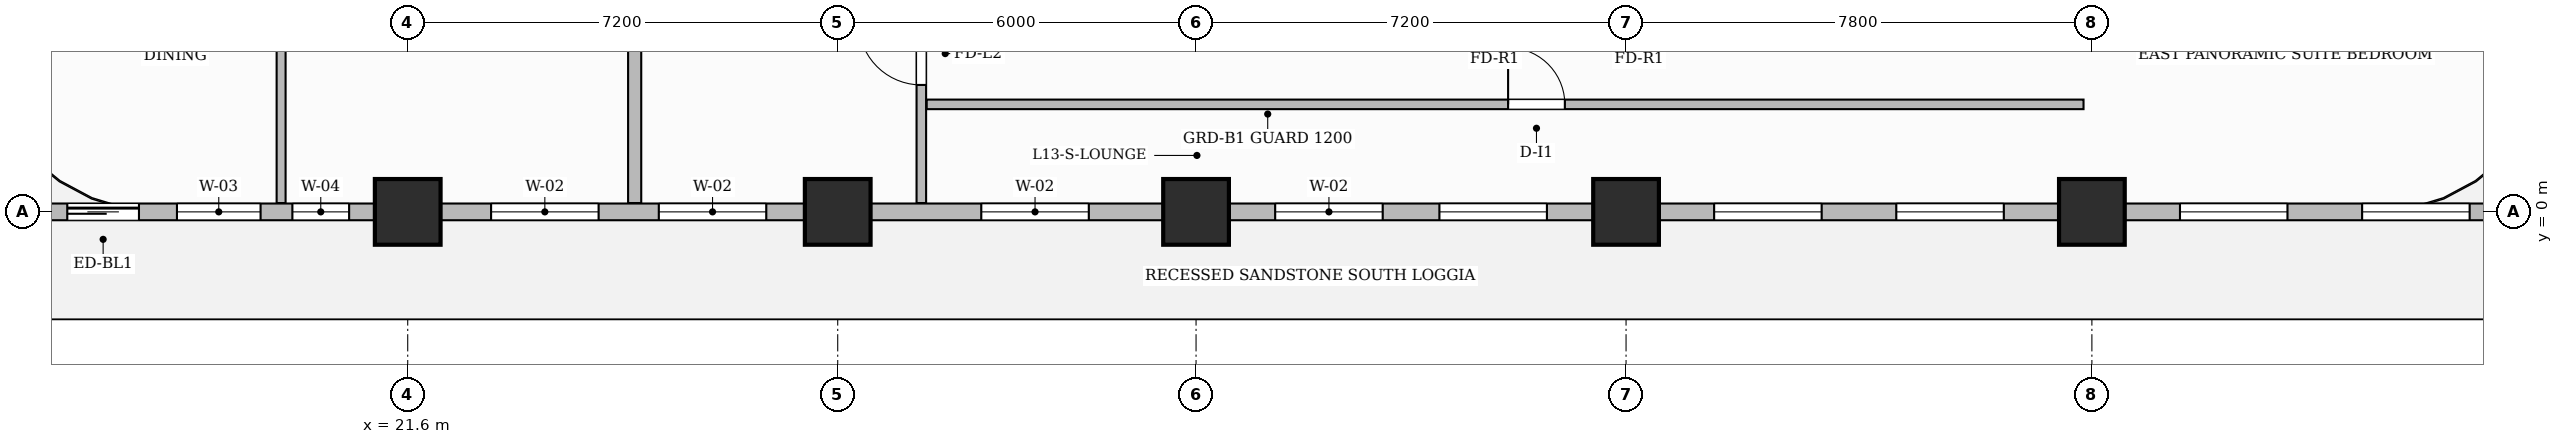
"""IFC4 building model, lengths in metres.
Left out: names, types, materials, properties, quantities, classifications, styles, units other than length and angle.
Written with IfcOpenShell. Run it as: python <this file> out.ifc"""

import sys

from ifc_helpers import new_model, si_unit, direction, frame, frame_2d, origin, origin_2d, place, context, subcontext, project, spatial, rectangle, extrude, source, transform, mapped, element, fill, save


model = new_model("IFC4")
c1 = context("Model", 3, precision=1e-05, world=origin(), true_north=direction((0.0, 1.0)))
c2 = subcontext(c1, "Body", "Model", "MODEL_VIEW")
j1 = project(units=[si_unit("LENGTHUNIT", "METRE"), si_unit("PLANEANGLEUNIT", "RADIAN")], contexts=[c1])
p1 = place(None, origin())
s1 = spatial("IfcSite", under=j1, at=p1, CompositionType="ELEMENT")
p2 = place(p1, origin())
s2 = spatial("IfcBuilding", under=s1, at=p2, CompositionType="ELEMENT")
p3 = place(p2, frame((0.0, 0.0, 58.3)))
s3 = spatial("IfcBuildingStorey", under=s2, at=p3, CompositionType="ELEMENT", Elevation=58.3)
m1 = source(origin(), c2, "Body", "SweptSolid", [
    extrude(rectangle(XDim=1.1, YDim=1.1, at=origin_2d()), origin(), (0.0, 0.0, 1.0), 3.7),
])
for number, where, z_axis, x_axis in (
    (1, (21.6, 0.0, 0.0), (0.0, 0.0, 1.0), (1.0, 0.0, 0.0)),
    (2, (28.8, 0.0, 0.0), (0.0, 0.0, 1.0), (1.0, 0.0, 0.0)),
    (3, (34.8, 0.0, 0.0), (0.0, 0.0, 1.0), (1.0, 0.0, 0.0)),
    (4, (42.0, 0.0, 0.0), (0.0, 0.0, 1.0), (1.0, 0.0, 0.0)),
    (5, (49.8, 0.0, 0.0), (0.0, 0.0, 1.0), (1.0, 0.0, 0.0)),
):
    element("IfcColumn", number, at=place(p3, frame(where, z_axis=z_axis, x_axis=x_axis)), inside=s3, PredefinedType="COLUMN", context=c2, shape_type="MappedRepresentation", body=[
        mapped(m1, transform((0.0, 0.0, 0.0), scale=1.0)),
    ])
p4 = place(p3, frame((30.2, 0.148, 0.0), z_axis=(0.0, 0.0, 1.0), x_axis=(0.0, 1.0, 0.0)))
e6 = element("IfcWall", 6, at=p4, inside=s3, PredefinedType="PARTITIONING", context=c2, shape_type="SweptSolid", body=[
    extrude(rectangle(XDim=9.312, YDim=0.16, at=frame_2d((4.656, 0.0))), origin(), (0.0, 0.0, 1.0), 3.45),
])
p5 = place(p4, frame((1.977, 0.0, 0.0)))
e7 = element("IfcOpeningElement", 7, at=p5, cuts=e6, PredefinedType="OPENING", context=c2, shape_type="SweptSolid", body=[
    extrude(rectangle(XDim=1.05, YDim=2.15, at=frame_2d((0.525, 1.075))), frame((0.0, 0.09, 0.0), z_axis=(0.0, -1.0, 0.0), x_axis=(1.0, 0.0, 0.0)), (0.0, 0.0, 1.0), 0.18),
])
p6 = place(p3, frame((30.29, 1.8, 0.0), z_axis=(0.0, 0.0, 1.0), x_axis=(1.0, 0.0, 0.0)))
e8 = element("IfcWall", 8, at=p6, inside=s3, PredefinedType="PARTITIONING", context=c2, shape_type="SweptSolid", body=[
    extrude(rectangle(XDim=19.37, YDim=0.16, at=frame_2d((9.685, 0.0))), origin(), (0.0, 0.0, 1.0), 3.45),
])
p7 = place(p6, frame((9.735, 0.0, 0.0)))
e9 = element("IfcOpeningElement", 9, at=p7, cuts=e8, PredefinedType="OPENING", context=c2, shape_type="SweptSolid", body=[
    extrude(rectangle(XDim=0.95, YDim=2.15, at=frame_2d((0.475, 1.075))), frame((0.0, 0.09, 0.0), z_axis=(0.0, -1.0, 0.0), x_axis=(1.0, 0.0, 0.0)), (0.0, 0.0, 1.0), 0.18),
])
p8 = place(p3, frame((25.4, 0.148, 0.0), z_axis=(0.0, 0.0, 1.0), x_axis=(0.0, 1.0, 0.0)))
e10 = element("IfcWall", 10, at=p8, inside=s3, PredefinedType="PARTITIONING", context=c2, shape_type="SweptSolid", body=[
    extrude(rectangle(XDim=9.312, YDim=0.22, at=frame_2d((4.656, 0.0))), origin(), (0.0, 0.0, 1.0), 3.035),
])
p9 = place(p3, frame((19.48, 0.148, 0.0), z_axis=(0.0, 0.0, 1.0), x_axis=(0.0, 1.0, 0.0)))
e11 = element("IfcWall", 11, at=p9, inside=s3, PredefinedType="PARTITIONING", context=c2, shape_type="SweptSolid", body=[
    extrude(rectangle(XDim=9.312, YDim=0.15, at=frame_2d((4.656, 0.0))), origin(), (0.0, 0.0, 1.0), 3.45),
])
p10 = place(p9, frame((7.877, 0.0, 0.0)))
e12 = element("IfcOpeningElement", 12, at=p10, cuts=e11, PredefinedType="OPENING", context=c2, shape_type="SweptSolid", body=[
    extrude(rectangle(XDim=0.9, YDim=2.15, at=frame_2d((0.45, 1.075))), frame((0.0, 0.085, 0.0), z_axis=(0.0, -1.0, 0.0), x_axis=(1.0, 0.0, 0.0)), (0.0, 0.0, 1.0), 0.17),
])
p11 = place(p3, frame((14.4, 0.0, 0.0), z_axis=(0.0, 0.0, 1.0), x_axis=(1.0, 0.0, 0.0)))
e13 = element("IfcWall", 13, at=p11, inside=s3, PredefinedType="SOLIDWALL", context=c2, shape_type="SweptSolid", body=[
    extrude(rectangle(XDim=43.2, YDim=0.28, at=frame_2d((21.6, 0.0))), origin(), (0.0, 0.0, 1.0), 2.885),
])
p12 = place(p11, frame((1.5, 0.0, 0.0)))
e14 = element("IfcOpeningElement", 14, at=p12, cuts=e13, PredefinedType="OPENING", context=c2, shape_type="SweptSolid", body=[
    extrude(rectangle(XDim=1.2, YDim=2.2, at=frame_2d((0.6, 1.1))), frame((0.0, 0.15, 0.0), z_axis=(0.0, -1.0, 0.0), x_axis=(1.0, 0.0, 0.0)), (0.0, 0.0, 1.0), 0.3),
])
p13 = place(p11, frame((3.336, 0.0, 0.8)))
e15 = element("IfcOpeningElement", 15, at=p13, cuts=e13, PredefinedType="OPENING", context=c2, shape_type="SweptSolid", body=[
    extrude(rectangle(XDim=1.4, YDim=1.85, at=frame_2d((0.7, 0.925))), frame((0.0, 0.15, 0.0), z_axis=(0.0, -1.0, 0.0), x_axis=(1.0, 0.0, 0.0)), (0.0, 0.0, 1.0), 0.3),
])
p14 = place(p11, frame((5.269, 0.0, 0.8)))
e16 = element("IfcOpeningElement", 16, at=p14, cuts=e13, PredefinedType="OPENING", context=c2, shape_type="SweptSolid", body=[
    extrude(rectangle(XDim=0.95, YDim=1.75, at=frame_2d((0.475, 0.875))), frame((0.0, 0.15, 0.0), z_axis=(0.0, -1.0, 0.0), x_axis=(1.0, 0.0, 0.0)), (0.0, 0.0, 1.0), 0.3),
])
p15 = place(p11, frame((8.596, 0.0, 0.8)))
e17 = element("IfcOpeningElement", 17, at=p15, cuts=e13, PredefinedType="OPENING", context=c2, shape_type="SweptSolid", body=[
    extrude(rectangle(XDim=1.8, YDim=1.85, at=frame_2d((0.9, 0.925))), frame((0.0, 0.15, 0.0), z_axis=(0.0, -1.0, 0.0), x_axis=(1.0, 0.0, 0.0)), (0.0, 0.0, 1.0), 0.3),
])
p16 = place(p11, frame((11.404, 0.0, 0.8)))
e18 = element("IfcOpeningElement", 18, at=p16, cuts=e13, PredefinedType="OPENING", context=c2, shape_type="SweptSolid", body=[
    extrude(rectangle(XDim=1.8, YDim=1.85, at=frame_2d((0.9, 0.925))), frame((0.0, 0.15, 0.0), z_axis=(0.0, -1.0, 0.0), x_axis=(1.0, 0.0, 0.0)), (0.0, 0.0, 1.0), 0.3),
])
p17 = place(p11, frame((16.804, 0.0, 0.8)))
e19 = element("IfcOpeningElement", 19, at=p17, cuts=e13, PredefinedType="OPENING", context=c2, shape_type="SweptSolid", body=[
    extrude(rectangle(XDim=1.8, YDim=1.85, at=frame_2d((0.9, 0.925))), frame((0.0, 0.15, 0.0), z_axis=(0.0, -1.0, 0.0), x_axis=(1.0, 0.0, 0.0)), (0.0, 0.0, 1.0), 0.3),
])
p18 = place(p11, frame((21.725, 0.0, 0.8)))
e20 = element("IfcOpeningElement", 20, at=p18, cuts=e13, PredefinedType="OPENING", context=c2, shape_type="SweptSolid", body=[
    extrude(rectangle(XDim=1.8, YDim=1.85, at=frame_2d((0.9, 0.925))), frame((0.0, 0.15, 0.0), z_axis=(0.0, -1.0, 0.0), x_axis=(1.0, 0.0, 0.0)), (0.0, 0.0, 1.0), 0.3),
])
p19 = place(p11, frame((24.475, 0.0, 0.8)))
e21 = element("IfcOpeningElement", 21, at=p19, cuts=e13, PredefinedType="OPENING", context=c2, shape_type="SweptSolid", body=[
    extrude(rectangle(XDim=1.8, YDim=1.85, at=frame_2d((0.9, 0.925))), frame((0.0, 0.15, 0.0), z_axis=(0.0, -1.0, 0.0), x_axis=(1.0, 0.0, 0.0)), (0.0, 0.0, 1.0), 0.3),
])
p20 = place(p11, frame((29.075, 0.0, 0.8)))
e22 = element("IfcOpeningElement", 22, at=p20, cuts=e13, PredefinedType="OPENING", context=c2, shape_type="SweptSolid", body=[
    extrude(rectangle(XDim=1.8, YDim=1.85, at=frame_2d((0.9, 0.925))), frame((0.0, 0.15, 0.0), z_axis=(0.0, -1.0, 0.0), x_axis=(1.0, 0.0, 0.0)), (0.0, 0.0, 1.0), 0.3),
])
p21 = place(p11, frame((32.125, 0.0, 0.8)))
e23 = element("IfcOpeningElement", 23, at=p21, cuts=e13, PredefinedType="OPENING", context=c2, shape_type="SweptSolid", body=[
    extrude(rectangle(XDim=1.8, YDim=1.85, at=frame_2d((0.9, 0.925))), frame((0.0, 0.15, 0.0), z_axis=(0.0, -1.0, 0.0), x_axis=(1.0, 0.0, 0.0)), (0.0, 0.0, 1.0), 0.3),
])
p22 = place(p11, frame((36.875, 0.0, 0.8)))
e24 = element("IfcOpeningElement", 24, at=p22, cuts=e13, PredefinedType="OPENING", context=c2, shape_type="SweptSolid", body=[
    extrude(rectangle(XDim=1.8, YDim=1.85, at=frame_2d((0.9, 0.925))), frame((0.0, 0.15, 0.0), z_axis=(0.0, -1.0, 0.0), x_axis=(1.0, 0.0, 0.0)), (0.0, 0.0, 1.0), 0.3),
])
p23 = place(p11, frame((39.925, 0.0, 0.8)))
e25 = element("IfcOpeningElement", 25, at=p23, cuts=e13, PredefinedType="OPENING", context=c2, shape_type="SweptSolid", body=[
    extrude(rectangle(XDim=1.8, YDim=1.85, at=frame_2d((0.9, 0.925))), frame((0.0, 0.15, 0.0), z_axis=(0.0, -1.0, 0.0), x_axis=(1.0, 0.0, 0.0)), (0.0, 0.0, 1.0), 0.3),
])
m2 = source(origin(), c2, "Body", "SweptSolid", [
    extrude(rectangle(XDim=1.05, YDim=2.15, at=frame_2d((0.525, 1.075))), frame((0.0, 0.025, 0.0), z_axis=(0.0, -1.0, 0.0), x_axis=(1.0, 0.0, 0.0)), (0.0, 0.0, 1.0), 0.05),
])
p24 = place(p5, origin())
e26 = element("IfcDoor", 26, at=p24, inside=s3, OperationType="SINGLE_SWING_RIGHT", PredefinedType="DOOR", context=c2, shape_type="MappedRepresentation", body=[
    mapped(m2, transform((0.0, 0.0, 0.0), scale=1.0)),
])
fill(e7, e26)
m3 = source(origin(), c2, "Body", "SweptSolid", [
    extrude(rectangle(XDim=0.95, YDim=2.15, at=frame_2d((0.475, 1.075))), frame((0.0, 0.025, 0.0), z_axis=(0.0, -1.0, 0.0), x_axis=(1.0, 0.0, 0.0)), (0.0, 0.0, 1.0), 0.05),
])
p25 = place(p7, origin())
e27 = element("IfcDoor", 27, at=p25, inside=s3, OperationType="SINGLE_SWING_LEFT", PredefinedType="DOOR", context=c2, shape_type="MappedRepresentation", body=[
    mapped(m3, transform((0.0, 0.0, 0.0), scale=1.0)),
])
fill(e9, e27)
m4 = source(origin(), c2, "Body", "SweptSolid", [
    extrude(rectangle(XDim=1.2, YDim=2.2, at=frame_2d((0.6, 1.1))), frame((0.0, 0.025, 0.0), z_axis=(0.0, -1.0, 0.0), x_axis=(1.0, 0.0, 0.0)), (0.0, 0.0, 1.0), 0.05),
])
p26 = place(p12, origin())
e28 = element("IfcDoor", 28, at=p26, inside=s3, OperationType="SLIDING_TO_LEFT", PredefinedType="DOOR", context=c2, shape_type="MappedRepresentation", body=[
    mapped(m4, transform((0.0, 0.0, 0.0), scale=1.0)),
])
fill(e14, e28)
m5 = source(origin(), c2, "Body", "SweptSolid", [
    extrude(rectangle(XDim=1.4, YDim=1.85, at=frame_2d((0.7, 0.925))), frame((0.0, 0.03, 0.0), z_axis=(0.0, -1.0, 0.0), x_axis=(1.0, 0.0, 0.0)), (0.0, 0.0, 1.0), 0.06),
])
p27 = place(p13, origin())
e29 = element("IfcWindow", 29, at=p27, inside=s3, PartitioningType="SINGLE_PANEL", PredefinedType="WINDOW", context=c2, shape_type="MappedRepresentation", body=[
    mapped(m5, transform((0.0, 0.0, 0.0), scale=1.0)),
])
fill(e15, e29)
m6 = source(origin(), c2, "Body", "SweptSolid", [
    extrude(rectangle(XDim=0.95, YDim=1.75, at=frame_2d((0.475, 0.875))), frame((0.0, 0.03, 0.0), z_axis=(0.0, -1.0, 0.0), x_axis=(1.0, 0.0, 0.0)), (0.0, 0.0, 1.0), 0.06),
])
p28 = place(p14, origin())
e30 = element("IfcWindow", 30, at=p28, inside=s3, PartitioningType="SINGLE_PANEL", PredefinedType="WINDOW", context=c2, shape_type="MappedRepresentation", body=[
    mapped(m6, transform((0.0, 0.0, 0.0), scale=1.0)),
])
fill(e16, e30)
m7 = source(origin(), c2, "Body", "SweptSolid", [
    extrude(rectangle(XDim=1.8, YDim=1.85, at=frame_2d((0.9, 0.925))), frame((0.0, 0.03, 0.0), z_axis=(0.0, -1.0, 0.0), x_axis=(1.0, 0.0, 0.0)), (0.0, 0.0, 1.0), 0.06),
])
p29 = place(p15, origin())
e31 = element("IfcWindow", 31, at=p29, inside=s3, PartitioningType="DOUBLE_PANEL_VERTICAL", PredefinedType="WINDOW", context=c2, shape_type="MappedRepresentation", body=[
    mapped(m7, transform((0.0, 0.0, 0.0), scale=1.0)),
])
fill(e17, e31)
p30 = place(p16, origin())
e32 = element("IfcWindow", 32, at=p30, inside=s3, PartitioningType="DOUBLE_PANEL_VERTICAL", PredefinedType="WINDOW", context=c2, shape_type="MappedRepresentation", body=[
    mapped(m7, transform((0.0, 0.0, 0.0), scale=1.0)),
])
fill(e18, e32)
p31 = place(p17, origin())
e33 = element("IfcWindow", 33, at=p31, inside=s3, PartitioningType="DOUBLE_PANEL_VERTICAL", PredefinedType="WINDOW", context=c2, shape_type="MappedRepresentation", body=[
    mapped(m7, transform((0.0, 0.0, 0.0), scale=1.0)),
])
fill(e19, e33)
p32 = place(p18, origin())
e34 = element("IfcWindow", 34, at=p32, inside=s3, PartitioningType="DOUBLE_PANEL_VERTICAL", PredefinedType="WINDOW", context=c2, shape_type="MappedRepresentation", body=[
    mapped(m7, transform((0.0, 0.0, 0.0), scale=1.0)),
])
fill(e20, e34)
p33 = place(p19, origin())
e35 = element("IfcWindow", 35, at=p33, inside=s3, PartitioningType="DOUBLE_PANEL_VERTICAL", PredefinedType="WINDOW", context=c2, shape_type="MappedRepresentation", body=[
    mapped(m7, transform((0.0, 0.0, 0.0), scale=1.0)),
])
fill(e21, e35)
p34 = place(p20, origin())
e36 = element("IfcWindow", 36, at=p34, inside=s3, PartitioningType="DOUBLE_PANEL_VERTICAL", PredefinedType="WINDOW", context=c2, shape_type="MappedRepresentation", body=[
    mapped(m7, transform((0.0, 0.0, 0.0), scale=1.0)),
])
fill(e22, e36)
p35 = place(p21, origin())
e37 = element("IfcWindow", 37, at=p35, inside=s3, PartitioningType="DOUBLE_PANEL_VERTICAL", PredefinedType="WINDOW", context=c2, shape_type="MappedRepresentation", body=[
    mapped(m7, transform((0.0, 0.0, 0.0), scale=1.0)),
])
fill(e23, e37)
p36 = place(p22, origin())
e38 = element("IfcWindow", 38, at=p36, inside=s3, PartitioningType="DOUBLE_PANEL_VERTICAL", PredefinedType="WINDOW", context=c2, shape_type="MappedRepresentation", body=[
    mapped(m7, transform((0.0, 0.0, 0.0), scale=1.0)),
])
fill(e24, e38)
p37 = place(p23, origin())
e39 = element("IfcWindow", 39, at=p37, inside=s3, PartitioningType="DOUBLE_PANEL_VERTICAL", PredefinedType="WINDOW", context=c2, shape_type="MappedRepresentation", body=[
    mapped(m7, transform((0.0, 0.0, 0.0), scale=1.0)),
])
fill(e25, e39)
save(model, sys.argv[1])
